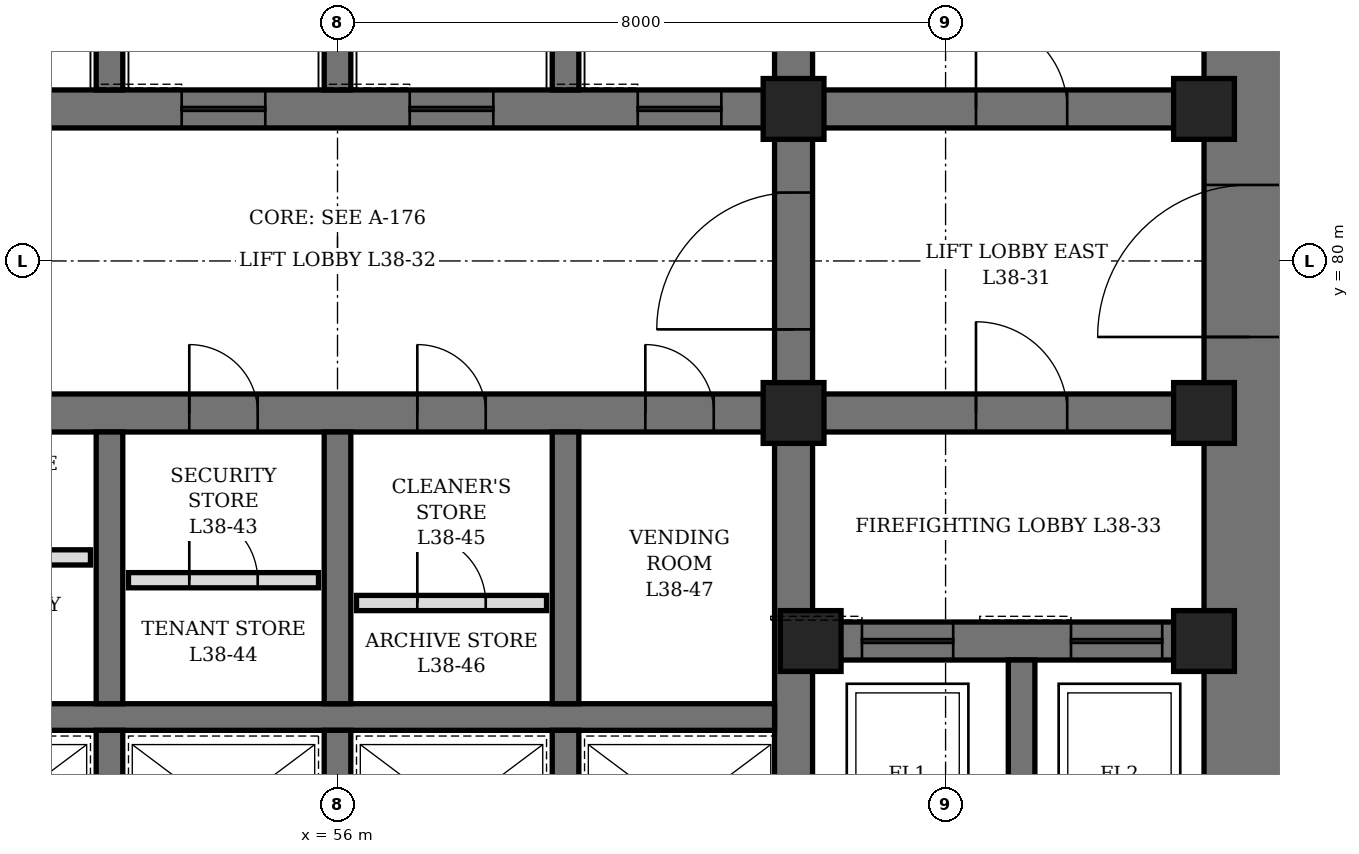
"""IFC4 building model, lengths in metres.
Left out: names, types, materials, properties, quantities, classifications, styles, units other than length and angle.
Written with IfcOpenShell. Run it as: python <this file> out.ifc"""

import sys

from ifc_helpers import new_model, si_unit, direction, frame, frame_2d, origin, origin_2d, place, context, subcontext, project, spatial, rectangle, hollow_rectangle, extrude, element, fill, save


model = new_model("IFC4")
c1 = context("Model", 3, precision=1e-05, world=origin(), true_north=direction((0.0, 1.0)))
c2 = subcontext(c1, "Body", "Model", "MODEL_VIEW")
j1 = project(units=[si_unit("LENGTHUNIT", "METRE"), si_unit("PLANEANGLEUNIT", "RADIAN")], contexts=[c1])
p1 = place(None, origin())
s1 = spatial("IfcSite", under=j1, at=p1, CompositionType="ELEMENT")
p2 = place(p1, origin())
s2 = spatial("IfcBuilding", under=s1, at=p2, CompositionType="ELEMENT")
p3 = place(p2, frame((0.0, 0.0, 171.1)))
s3 = spatial("IfcBuildingStorey", under=s2, at=p3, CompositionType="ELEMENT", Elevation=171.1)
p4 = place(p3, frame((68.0, 70.4, 0.0), z_axis=(0.0, 0.0, 1.0), x_axis=(0.0, 1.0, 0.0)))
e1 = element("IfcWall", 1, at=p4, inside=s3, PredefinedType="SHEAR", context=c2, shape_type="SweptSolid", body=[
    extrude(rectangle(XDim=19.2, YDim=1.2, at=frame_2d((9.6, 0.0))), origin(), (0.0, 0.0, 1.0), 4.2),
])
p5 = place(p4, frame((8.6, 0.0, 0.0)))
e2 = element("IfcOpeningElement", 2, at=p5, cuts=e1, PredefinedType="OPENING", context=c2, shape_type="SweptSolid", body=[
    extrude(rectangle(XDim=2.0, YDim=2.4, at=frame_2d((1.0, 1.2))), frame((0.0, 0.61, 0.0), z_axis=(0.0, -1.0, 0.0), x_axis=(1.0, 0.0, 0.0)), (0.0, 0.0, 1.0), 1.22),
])
p6 = place(p3, frame((62.0, 71.6, 0.0), z_axis=(0.0, 0.0, 1.0), x_axis=(0.0, 1.0, 0.0)))
e3 = element("IfcWall", 3, at=p6, inside=s3, PredefinedType="SHEAR", context=c2, shape_type="SweptSolid", body=[
    extrude(rectangle(XDim=16.8, YDim=0.5, at=frame_2d((8.4, 0.0))), origin(), (0.0, 0.0, 1.0), 4.2),
])
p7 = place(p6, frame((7.5, 0.0, 0.0)))
e4 = element("IfcOpeningElement", 4, at=p7, cuts=e3, PredefinedType="OPENING", context=c2, shape_type="SweptSolid", body=[
    extrude(rectangle(XDim=1.8, YDim=2.4, at=frame_2d((0.9, 1.2))), frame((0.0, 0.26, 0.0), z_axis=(0.0, -1.0, 0.0), x_axis=(1.0, 0.0, 0.0)), (0.0, 0.0, 1.0), 0.52),
])
p8 = place(p3, frame((62.25, 75.0, 0.0), z_axis=(0.0, 0.0, 1.0), x_axis=(1.0, 0.0, 0.0)))
e5 = element("IfcWall", 5, at=p8, inside=s3, PredefinedType="SHEAR", context=c2, shape_type="SweptSolid", body=[
    extrude(rectangle(XDim=5.15, YDim=0.5, at=frame_2d((2.575, 0.0))), origin(), (0.0, 0.0, 1.0), 4.2),
])
p9 = place(p8, frame((0.65, 0.0, 0.0)))
e6 = element("IfcOpeningElement", 6, at=p9, cuts=e5, PredefinedType="OPENING", context=c2, shape_type="SweptSolid", body=[
    extrude(rectangle(XDim=1.2, YDim=2.2, at=frame_2d((0.6, 1.1))), frame((0.0, 0.26, 0.0), z_axis=(0.0, -1.0, 0.0), x_axis=(1.0, 0.0, 0.0)), (0.0, 0.0, 1.0), 0.52),
])
p10 = place(p8, frame((3.4, 0.0, 0.0)))
e7 = element("IfcOpeningElement", 7, at=p10, cuts=e5, PredefinedType="OPENING", context=c2, shape_type="SweptSolid", body=[
    extrude(rectangle(XDim=1.2, YDim=2.2, at=frame_2d((0.6, 1.1))), frame((0.0, 0.26, 0.0), z_axis=(0.0, -1.0, 0.0), x_axis=(1.0, 0.0, 0.0)), (0.0, 0.0, 1.0), 0.52),
])
p11 = place(p3, frame((62.25, 78.0, 0.0), z_axis=(0.0, 0.0, 1.0), x_axis=(1.0, 0.0, 0.0)))
e8 = element("IfcWall", 8, at=p11, inside=s3, PredefinedType="SHEAR", context=c2, shape_type="SweptSolid", body=[
    extrude(rectangle(XDim=5.15, YDim=0.5, at=frame_2d((2.575, 0.0))), origin(), (0.0, 0.0, 1.0), 4.2),
])
p12 = place(p11, frame((2.15, 0.0, 0.0)))
e9 = element("IfcOpeningElement", 9, at=p12, cuts=e8, PredefinedType="OPENING", context=c2, shape_type="SweptSolid", body=[
    extrude(rectangle(XDim=1.2, YDim=2.1, at=frame_2d((0.6, 1.05))), frame((0.0, 0.26, 0.0), z_axis=(0.0, -1.0, 0.0), x_axis=(1.0, 0.0, 0.0)), (0.0, 0.0, 1.0), 0.52),
])
p13 = place(p3, frame((62.25, 82.0, 0.0), z_axis=(0.0, 0.0, 1.0), x_axis=(1.0, 0.0, 0.0)))
e10 = element("IfcWall", 10, at=p13, inside=s3, PredefinedType="SHEAR", context=c2, shape_type="SweptSolid", body=[
    extrude(rectangle(XDim=5.15, YDim=0.5, at=frame_2d((2.575, 0.0))), origin(), (0.0, 0.0, 1.0), 4.2),
])
p14 = place(p13, frame((2.15, 0.0, 0.0)))
e11 = element("IfcOpeningElement", 11, at=p14, cuts=e10, PredefinedType="OPENING", context=c2, shape_type="SweptSolid", body=[
    extrude(rectangle(XDim=1.2, YDim=2.1, at=frame_2d((0.6, 1.05))), frame((0.0, 0.26, 0.0), z_axis=(0.0, -1.0, 0.0), x_axis=(1.0, 0.0, 0.0)), (0.0, 0.0, 1.0), 0.52),
])
p15 = place(p3, frame((50.25, 78.0, 0.0), z_axis=(0.0, 0.0, 1.0), x_axis=(1.0, 0.0, 0.0)))
e12 = element("IfcWall", 12, at=p15, inside=s3, PredefinedType="SHEAR", context=c2, shape_type="SweptSolid", body=[
    extrude(rectangle(XDim=11.5, YDim=0.5, at=frame_2d((5.75, 0.0))), origin(), (0.0, 0.0, 1.0), 4.2),
])
p16 = place(p15, frame((0.8, 0.0, 0.0)))
e13 = element("IfcOpeningElement", 13, at=p16, cuts=e12, PredefinedType="OPENING", context=c2, shape_type="SweptSolid", body=[
    extrude(rectangle(XDim=0.9, YDim=2.1, at=frame_2d((0.45, 1.05))), frame((0.0, 0.26, 0.0), z_axis=(0.0, -1.0, 0.0), x_axis=(1.0, 0.0, 0.0)), (0.0, 0.0, 1.0), 0.52),
])
p17 = place(p15, frame((3.8, 0.0, 0.0)))
e14 = element("IfcOpeningElement", 14, at=p17, cuts=e12, PredefinedType="OPENING", context=c2, shape_type="SweptSolid", body=[
    extrude(rectangle(XDim=0.9, YDim=2.1, at=frame_2d((0.45, 1.05))), frame((0.0, 0.26, 0.0), z_axis=(0.0, -1.0, 0.0), x_axis=(1.0, 0.0, 0.0)), (0.0, 0.0, 1.0), 0.52),
])
p18 = place(p15, frame((6.8, 0.0, 0.0)))
e15 = element("IfcOpeningElement", 15, at=p18, cuts=e12, PredefinedType="OPENING", context=c2, shape_type="SweptSolid", body=[
    extrude(rectangle(XDim=0.9, YDim=2.1, at=frame_2d((0.45, 1.05))), frame((0.0, 0.26, 0.0), z_axis=(0.0, -1.0, 0.0), x_axis=(1.0, 0.0, 0.0)), (0.0, 0.0, 1.0), 0.52),
])
p19 = place(p15, frame((9.8, 0.0, 0.0)))
e16 = element("IfcOpeningElement", 16, at=p19, cuts=e12, PredefinedType="OPENING", context=c2, shape_type="SweptSolid", body=[
    extrude(rectangle(XDim=0.9, YDim=2.1, at=frame_2d((0.45, 1.05))), frame((0.0, 0.26, 0.0), z_axis=(0.0, -1.0, 0.0), x_axis=(1.0, 0.0, 0.0)), (0.0, 0.0, 1.0), 0.52),
])
p20 = place(p3, frame((50.25, 82.0, 0.0), z_axis=(0.0, 0.0, 1.0), x_axis=(1.0, 0.0, 0.0)))
e17 = element("IfcWall", 17, at=p20, inside=s3, PredefinedType="SHEAR", context=c2, shape_type="SweptSolid", body=[
    extrude(rectangle(XDim=11.5, YDim=0.5, at=frame_2d((5.75, 0.0))), origin(), (0.0, 0.0, 1.0), 4.2),
])
p21 = place(p20, frame((0.7, 0.0, 0.0)))
e18 = element("IfcOpeningElement", 18, at=p21, cuts=e17, PredefinedType="OPENING", context=c2, shape_type="SweptSolid", body=[
    extrude(rectangle(XDim=1.1, YDim=2.2, at=frame_2d((0.55, 1.1))), frame((0.0, 0.26, 0.0), z_axis=(0.0, -1.0, 0.0), x_axis=(1.0, 0.0, 0.0)), (0.0, 0.0, 1.0), 0.52),
])
p22 = place(p20, frame((3.7, 0.0, 0.0)))
e19 = element("IfcOpeningElement", 19, at=p22, cuts=e17, PredefinedType="OPENING", context=c2, shape_type="SweptSolid", body=[
    extrude(rectangle(XDim=1.1, YDim=2.2, at=frame_2d((0.55, 1.1))), frame((0.0, 0.26, 0.0), z_axis=(0.0, -1.0, 0.0), x_axis=(1.0, 0.0, 0.0)), (0.0, 0.0, 1.0), 0.52),
])
p23 = place(p20, frame((6.7, 0.0, 0.0)))
e20 = element("IfcOpeningElement", 20, at=p23, cuts=e17, PredefinedType="OPENING", context=c2, shape_type="SweptSolid", body=[
    extrude(rectangle(XDim=1.1, YDim=2.2, at=frame_2d((0.55, 1.1))), frame((0.0, 0.26, 0.0), z_axis=(0.0, -1.0, 0.0), x_axis=(1.0, 0.0, 0.0)), (0.0, 0.0, 1.0), 0.52),
])
p24 = place(p20, frame((9.7, 0.0, 0.0)))
e21 = element("IfcOpeningElement", 21, at=p24, cuts=e17, PredefinedType="OPENING", context=c2, shape_type="SweptSolid", body=[
    extrude(rectangle(XDim=1.1, YDim=2.2, at=frame_2d((0.55, 1.1))), frame((0.0, 0.26, 0.0), z_axis=(0.0, -1.0, 0.0), x_axis=(1.0, 0.0, 0.0)), (0.0, 0.0, 1.0), 0.52),
])
p25 = place(p3, frame((50.25, 74.0, 0.0), z_axis=(0.0, 0.0, 1.0), x_axis=(1.0, 0.0, 0.0)))
e22 = element("IfcWall", 22, at=p25, inside=s3, PredefinedType="SHEAR", context=c2, shape_type="SweptSolid", body=[
    extrude(rectangle(XDim=11.5, YDim=0.35, at=frame_2d((5.75, 0.0))), origin(), (0.0, 0.0, 1.0), 4.2),
])
p26 = place(p3, frame((53.0, 71.6, 0.0), z_axis=(0.0, 0.0, 1.0), x_axis=(0.0, 1.0, 0.0)))
e23 = element("IfcWall", 23, at=p26, inside=s3, PredefinedType="SHEAR", context=c2, shape_type="SweptSolid", body=[
    extrude(rectangle(XDim=2.225, YDim=0.35, at=frame_2d((1.112, 0.0))), origin(), (0.0, 0.0, 1.0), 4.2),
])
p27 = place(p3, frame((53.0, 74.175, 0.0), z_axis=(0.0, 0.0, 1.0), x_axis=(0.0, 1.0, 0.0)))
e24 = element("IfcWall", 24, at=p27, inside=s3, PredefinedType="SHEAR", context=c2, shape_type="SweptSolid", body=[
    extrude(rectangle(XDim=3.575, YDim=0.35, at=frame_2d((1.788, 0.0))), origin(), (0.0, 0.0, 1.0), 4.2),
])
p28 = place(p3, frame((53.0, 82.25, 0.0), z_axis=(0.0, 0.0, 1.0), x_axis=(0.0, 1.0, 0.0)))
e25 = element("IfcWall", 25, at=p28, inside=s3, PredefinedType="SHEAR", context=c2, shape_type="SweptSolid", body=[
    extrude(rectangle(XDim=3.5, YDim=0.35, at=frame_2d((1.75, 0.0))), origin(), (0.0, 0.0, 1.0), 4.2),
])
p29 = place(p3, frame((56.0, 71.6, 0.0), z_axis=(0.0, 0.0, 1.0), x_axis=(0.0, 1.0, 0.0)))
e26 = element("IfcWall", 26, at=p29, inside=s3, PredefinedType="SHEAR", context=c2, shape_type="SweptSolid", body=[
    extrude(rectangle(XDim=2.225, YDim=0.35, at=frame_2d((1.112, 0.0))), origin(), (0.0, 0.0, 1.0), 4.2),
])
p30 = place(p3, frame((56.0, 74.175, 0.0), z_axis=(0.0, 0.0, 1.0), x_axis=(0.0, 1.0, 0.0)))
e27 = element("IfcWall", 27, at=p30, inside=s3, PredefinedType="SHEAR", context=c2, shape_type="SweptSolid", body=[
    extrude(rectangle(XDim=3.575, YDim=0.35, at=frame_2d((1.788, 0.0))), origin(), (0.0, 0.0, 1.0), 4.2),
])
p31 = place(p3, frame((56.0, 82.25, 0.0), z_axis=(0.0, 0.0, 1.0), x_axis=(0.0, 1.0, 0.0)))
e28 = element("IfcWall", 28, at=p31, inside=s3, PredefinedType="SHEAR", context=c2, shape_type="SweptSolid", body=[
    extrude(rectangle(XDim=3.5, YDim=0.35, at=frame_2d((1.75, 0.0))), origin(), (0.0, 0.0, 1.0), 4.2),
])
p32 = place(p3, frame((59.0, 71.6, 0.0), z_axis=(0.0, 0.0, 1.0), x_axis=(0.0, 1.0, 0.0)))
e29 = element("IfcWall", 29, at=p32, inside=s3, PredefinedType="SHEAR", context=c2, shape_type="SweptSolid", body=[
    extrude(rectangle(XDim=2.225, YDim=0.35, at=frame_2d((1.112, 0.0))), origin(), (0.0, 0.0, 1.0), 4.2),
])
p33 = place(p3, frame((59.0, 74.175, 0.0), z_axis=(0.0, 0.0, 1.0), x_axis=(0.0, 1.0, 0.0)))
e30 = element("IfcWall", 30, at=p33, inside=s3, PredefinedType="SHEAR", context=c2, shape_type="SweptSolid", body=[
    extrude(rectangle(XDim=3.575, YDim=0.35, at=frame_2d((1.788, 0.0))), origin(), (0.0, 0.0, 1.0), 4.2),
])
p34 = place(p3, frame((59.0, 82.25, 0.0), z_axis=(0.0, 0.0, 1.0), x_axis=(0.0, 1.0, 0.0)))
e31 = element("IfcWall", 31, at=p34, inside=s3, PredefinedType="SHEAR", context=c2, shape_type="SweptSolid", body=[
    extrude(rectangle(XDim=3.5, YDim=0.35, at=frame_2d((1.75, 0.0))), origin(), (0.0, 0.0, 1.0), 4.2),
])
p35 = place(p3, frame((65.0, 71.6, 0.0), z_axis=(0.0, 0.0, 1.0), x_axis=(0.0, 1.0, 0.0)))
e32 = element("IfcWall", 32, at=p35, inside=s3, PredefinedType="SHEAR", context=c2, shape_type="SweptSolid", body=[
    extrude(rectangle(XDim=3.15, YDim=0.35, at=frame_2d((1.575, 0.0))), origin(), (0.0, 0.0, 1.0), 4.2),
])
for number, where, z_axis, x_axis in (
    (33, (62.0, 78.0, 0.0), (0.0, 0.0, 1.0), (1.0, 0.0, 0.0)),
    (34, (62.0, 82.0, 0.0), (0.0, 0.0, 1.0), (1.0, 0.0, 0.0)),
    (35, (62.225, 75.0, 0.0), (0.0, 0.0, 1.0), (1.0, 0.0, 0.0)),
    (36, (67.4, 75.0, 0.0), (0.0, 0.0, 1.0), (1.0, 0.0, 0.0)),
    (37, (67.4, 78.0, 0.0), (0.0, 0.0, 1.0), (1.0, 0.0, 0.0)),
    (38, (67.4, 82.0, 0.0), (0.0, 0.0, 1.0), (1.0, 0.0, 0.0)),
):
    element("IfcColumn", number, at=place(p3, frame(where, z_axis=z_axis, x_axis=x_axis)), inside=s3, PredefinedType="COLUMN", context=c2, shape_type="SweptSolid", body=[
        extrude(hollow_rectangle(XDim=0.8, YDim=0.8, WallThickness=0.1, at=origin_2d()), origin(), (0.0, 0.0, 1.0), 4.2),
    ])
p36 = place(p3, frame((50.25, 76.1, 0.0), z_axis=(0.0, 0.0, 1.0), x_axis=(1.0, 0.0, 0.0)))
e39 = element("IfcWall", 39, at=p36, inside=s3, PredefinedType="PARTITIONING", context=c2, shape_type="SweptSolid", body=[
    extrude(rectangle(XDim=2.5, YDim=0.2, at=frame_2d((1.25, 0.0))), origin(), (0.0, 0.0, 1.0), 3.95),
])
p37 = place(p36, frame((0.8, 0.0, 0.0)))
e40 = element("IfcOpeningElement", 40, at=p37, cuts=e39, PredefinedType="OPENING", context=c2, shape_type="SweptSolid", body=[
    extrude(rectangle(XDim=0.9, YDim=2.1, at=frame_2d((0.45, 1.05))), frame((0.0, 0.11, 0.0), z_axis=(0.0, -1.0, 0.0), x_axis=(1.0, 0.0, 0.0)), (0.0, 0.0, 1.0), 0.22),
])
p38 = place(p3, frame((53.25, 75.8, 0.0), z_axis=(0.0, 0.0, 1.0), x_axis=(1.0, 0.0, 0.0)))
e41 = element("IfcWall", 41, at=p38, inside=s3, PredefinedType="PARTITIONING", context=c2, shape_type="SweptSolid", body=[
    extrude(rectangle(XDim=2.5, YDim=0.2, at=frame_2d((1.25, 0.0))), origin(), (0.0, 0.0, 1.0), 3.95),
])
p39 = place(p38, frame((0.8, 0.0, 0.0)))
e42 = element("IfcOpeningElement", 42, at=p39, cuts=e41, PredefinedType="OPENING", context=c2, shape_type="SweptSolid", body=[
    extrude(rectangle(XDim=0.9, YDim=2.1, at=frame_2d((0.45, 1.05))), frame((0.0, 0.11, 0.0), z_axis=(0.0, -1.0, 0.0), x_axis=(1.0, 0.0, 0.0)), (0.0, 0.0, 1.0), 0.22),
])
p40 = place(p3, frame((56.25, 75.5, 0.0), z_axis=(0.0, 0.0, 1.0), x_axis=(1.0, 0.0, 0.0)))
e43 = element("IfcWall", 43, at=p40, inside=s3, PredefinedType="PARTITIONING", context=c2, shape_type="SweptSolid", body=[
    extrude(rectangle(XDim=2.5, YDim=0.2, at=frame_2d((1.25, 0.0))), origin(), (0.0, 0.0, 1.0), 3.95),
])
p41 = place(p40, frame((0.8, 0.0, 0.0)))
e44 = element("IfcOpeningElement", 44, at=p41, cuts=e43, PredefinedType="OPENING", context=c2, shape_type="SweptSolid", body=[
    extrude(rectangle(XDim=0.9, YDim=2.1, at=frame_2d((0.45, 1.05))), frame((0.0, 0.11, 0.0), z_axis=(0.0, -1.0, 0.0), x_axis=(1.0, 0.0, 0.0)), (0.0, 0.0, 1.0), 0.22),
])
p42 = place(p17, origin())
e45 = element("IfcDoor", 45, at=p42, inside=s3, OperationType="SINGLE_SWING_LEFT", PredefinedType="DOOR", context=c2, shape_type="SweptSolid", body=[
    extrude(rectangle(XDim=0.9, YDim=2.1, at=frame_2d((0.45, 1.05))), frame((0.0, 0.25, 0.0), z_axis=(0.0, -1.0, 0.0), x_axis=(1.0, 0.0, 0.0)), (0.0, 0.0, 1.0), 0.5),
])
fill(e14, e45)
p43 = place(p39, origin())
e46 = element("IfcDoor", 46, at=p43, inside=s3, OperationType="SINGLE_SWING_LEFT", PredefinedType="DOOR", context=c2, shape_type="SweptSolid", body=[
    extrude(rectangle(XDim=0.9, YDim=2.1, at=frame_2d((0.45, 1.05))), frame((0.0, 0.1, 0.0), z_axis=(0.0, -1.0, 0.0), x_axis=(1.0, 0.0, 0.0)), (0.0, 0.0, 1.0), 0.199),
])
fill(e42, e46)
p44 = place(p18, origin())
e47 = element("IfcDoor", 47, at=p44, inside=s3, OperationType="SINGLE_SWING_LEFT", PredefinedType="DOOR", context=c2, shape_type="SweptSolid", body=[
    extrude(rectangle(XDim=0.9, YDim=2.1, at=frame_2d((0.45, 1.05))), frame((0.0, 0.25, 0.0), z_axis=(0.0, -1.0, 0.0), x_axis=(1.0, 0.0, 0.0)), (0.0, 0.0, 1.0), 0.5),
])
fill(e15, e47)
p45 = place(p41, origin())
e48 = element("IfcDoor", 48, at=p45, inside=s3, OperationType="SINGLE_SWING_LEFT", PredefinedType="DOOR", context=c2, shape_type="SweptSolid", body=[
    extrude(rectangle(XDim=0.9, YDim=2.1, at=frame_2d((0.45, 1.05))), frame((0.0, 0.1, 0.0), z_axis=(0.0, -1.0, 0.0), x_axis=(1.0, 0.0, 0.0)), (0.0, 0.0, 1.0), 0.199),
])
fill(e44, e48)
p46 = place(p19, origin())
e49 = element("IfcDoor", 49, at=p46, inside=s3, OperationType="SINGLE_SWING_LEFT", PredefinedType="DOOR", context=c2, shape_type="SweptSolid", body=[
    extrude(rectangle(XDim=0.9, YDim=2.1, at=frame_2d((0.45, 1.05))), frame((0.0, 0.25, 0.0), z_axis=(0.0, -1.0, 0.0), x_axis=(1.0, 0.0, 0.0)), (0.0, 0.0, 1.0), 0.5),
])
fill(e16, e49)
p47 = place(p14, origin())
e50 = element("IfcDoor", 50, at=p47, inside=s3, OperationType="SINGLE_SWING_LEFT", PredefinedType="DOOR", context=c2, shape_type="SweptSolid", body=[
    extrude(rectangle(XDim=1.2, YDim=2.1, at=frame_2d((0.6, 1.05))), frame((0.0, 0.25, 0.0), z_axis=(0.0, -1.0, 0.0), x_axis=(1.0, 0.0, 0.0)), (0.0, 0.0, 1.0), 0.5),
])
fill(e11, e50)
p48 = place(p5, origin())
e51 = element("IfcDoor", 51, at=p48, inside=s3, OperationType="DOUBLE_DOOR_SINGLE_SWING", PredefinedType="DOOR", context=c2, shape_type="SweptSolid", body=[
    extrude(rectangle(XDim=2.0, YDim=2.4, at=frame_2d((1.0, 1.2))), frame((0.0, 0.35, 0.0), z_axis=(0.0, -1.0, 0.0), x_axis=(1.0, 0.0, 0.0)), (0.0, 0.0, 1.0), 0.7),
])
fill(e2, e51)
p49 = place(p7, origin())
e52 = element("IfcDoor", 52, at=p49, inside=s3, OperationType="DOUBLE_DOOR_SINGLE_SWING", PredefinedType="DOOR", context=c2, shape_type="SweptSolid", body=[
    extrude(rectangle(XDim=1.8, YDim=2.4, at=frame_2d((0.9, 1.2))), frame((0.0, 0.25, 0.0), z_axis=(0.0, -1.0, 0.0), x_axis=(1.0, 0.0, 0.0)), (0.0, 0.0, 1.0), 0.5),
])
fill(e4, e52)
p50 = place(p12, origin())
e53 = element("IfcDoor", 53, at=p50, inside=s3, OperationType="SINGLE_SWING_RIGHT", PredefinedType="DOOR", context=c2, shape_type="SweptSolid", body=[
    extrude(rectangle(XDim=1.2, YDim=2.1, at=frame_2d((0.6, 1.05))), frame((0.0, 0.25, 0.0), z_axis=(0.0, -1.0, 0.0), x_axis=(1.0, 0.0, 0.0)), (0.0, 0.0, 1.0), 0.5),
])
fill(e9, e53)
p51 = place(p22, origin())
e54 = element("IfcDoor", 54, at=p51, inside=s3, OperationType="SLIDING_TO_LEFT", PredefinedType="DOOR", context=c2, shape_type="SweptSolid", body=[
    extrude(rectangle(XDim=1.1, YDim=2.2, at=frame_2d((0.55, 1.1))), frame((0.0, 0.25, 0.0), z_axis=(0.0, -1.0, 0.0), x_axis=(1.0, 0.0, 0.0)), (0.0, 0.0, 1.0), 0.5),
])
fill(e19, e54)
p52 = place(p23, origin())
e55 = element("IfcDoor", 55, at=p52, inside=s3, OperationType="SLIDING_TO_LEFT", PredefinedType="DOOR", context=c2, shape_type="SweptSolid", body=[
    extrude(rectangle(XDim=1.1, YDim=2.2, at=frame_2d((0.55, 1.1))), frame((0.0, 0.25, 0.0), z_axis=(0.0, -1.0, 0.0), x_axis=(1.0, 0.0, 0.0)), (0.0, 0.0, 1.0), 0.5),
])
fill(e20, e55)
p53 = place(p24, origin())
e56 = element("IfcDoor", 56, at=p53, inside=s3, OperationType="SLIDING_TO_LEFT", PredefinedType="DOOR", context=c2, shape_type="SweptSolid", body=[
    extrude(rectangle(XDim=1.1, YDim=2.2, at=frame_2d((0.55, 1.1))), frame((0.0, 0.25, 0.0), z_axis=(0.0, -1.0, 0.0), x_axis=(1.0, 0.0, 0.0)), (0.0, 0.0, 1.0), 0.5),
])
fill(e21, e56)
p54 = place(p9, origin())
e57 = element("IfcDoor", 57, at=p54, inside=s3, OperationType="SLIDING_TO_LEFT", PredefinedType="DOOR", context=c2, shape_type="SweptSolid", body=[
    extrude(rectangle(XDim=1.2, YDim=2.2, at=frame_2d((0.6, 1.1))), frame((0.0, 0.25, 0.0), z_axis=(0.0, -1.0, 0.0), x_axis=(1.0, 0.0, 0.0)), (0.0, 0.0, 1.0), 0.5),
])
fill(e6, e57)
p55 = place(p10, origin())
e58 = element("IfcDoor", 58, at=p55, inside=s3, OperationType="SLIDING_TO_LEFT", PredefinedType="DOOR", context=c2, shape_type="SweptSolid", body=[
    extrude(rectangle(XDim=1.2, YDim=2.2, at=frame_2d((0.6, 1.1))), frame((0.0, 0.25, 0.0), z_axis=(0.0, -1.0, 0.0), x_axis=(1.0, 0.0, 0.0)), (0.0, 0.0, 1.0), 0.5),
])
fill(e7, e58)
save(model, sys.argv[1])
